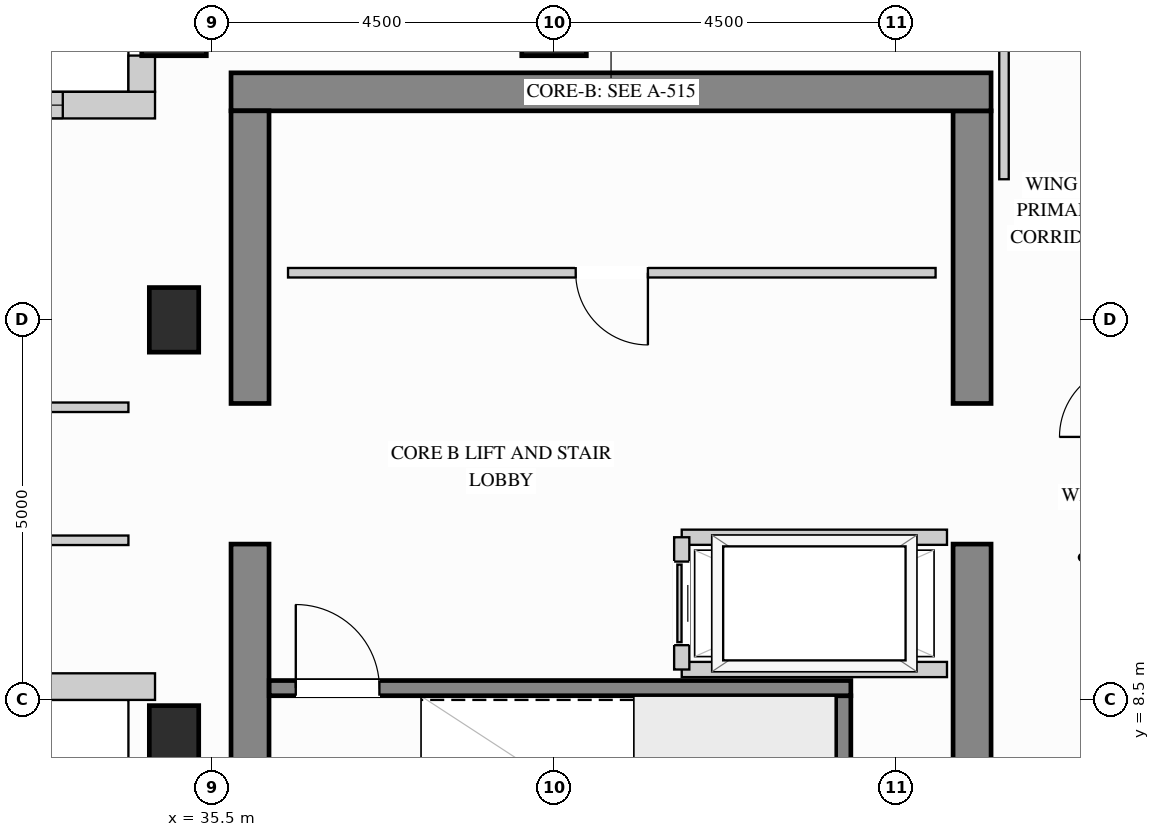
"""IFC4 building model, lengths in metres.
Left out: names, types, materials, properties, quantities, classifications, styles, units other than length and angle.
Written with IfcOpenShell. Run it as: python <this file> out.ifc"""

import sys

from ifc_helpers import new_model, si_unit, direction, frame, frame_2d, origin, origin_2d, place, context, subcontext, project, spatial, rectangle, extrude, source, transform, mapped, element, fill, save


model = new_model("IFC4")
c1 = context("Model", 3, precision=1e-05, world=origin(), true_north=direction((0.0, 1.0)))
c2 = subcontext(c1, "Body", "Model", "MODEL_VIEW")
j1 = project(units=[si_unit("LENGTHUNIT", "METRE"), si_unit("PLANEANGLEUNIT", "RADIAN")], contexts=[c1])
p1 = place(None, origin())
s1 = spatial("IfcSite", under=j1, at=p1, CompositionType="ELEMENT")
p2 = place(p1, origin())
s2 = spatial("IfcBuilding", under=s1, at=p2, CompositionType="ELEMENT")
p3 = place(p2, frame((0.0, 0.0, 223.2)))
s3 = spatial("IfcBuildingStorey", under=s2, at=p3, CompositionType="ELEMENT", Elevation=223.2)
m1 = source(origin(), c2, "Body", "SweptSolid", [
    extrude(rectangle(XDim=0.65, YDim=0.85, at=origin_2d()), origin(), (0.0, 0.0, 1.0), 3.4),
])
for number, where, z_axis, x_axis in (
    (1, (35.0, 13.5, 0.0), (0.0, 0.0, 1.0), (1.0, 0.0, 0.0)),
    (2, (35.0, 8.0, 0.0), (0.0, 0.0, 1.0), (1.0, 0.0, 0.0)),
):
    element("IfcColumn", number, at=place(p3, frame(where, z_axis=z_axis, x_axis=x_axis)), inside=s3, PredefinedType="COLUMN", context=c2, shape_type="MappedRepresentation", body=[
        mapped(m1, transform((0.0, 0.0, 0.0), x_axis=(1.0, 0.0, 0.0), y_axis=(0.0, 1.0, 0.0), z_axis=(0.0, 0.0, 1.0))),
    ])
m2 = source(origin(), c2, "Body", "SweptSolid", [
    extrude(rectangle(XDim=0.85, YDim=0.85, at=origin_2d()), origin(), (0.0, 0.0, 1.0), 3.4),
])
for number, where, z_axis, x_axis in (
    (3, (35.0, 17.4, 0.0), (0.0, 0.0, 1.0), (1.0, 0.0, 0.0)),
    (4, (40.0, 17.4, 0.0), (0.0, 0.0, 1.0), (1.0, 0.0, 0.0)),
):
    element("IfcColumn", number, at=place(p3, frame(where, z_axis=z_axis, x_axis=x_axis)), inside=s3, PredefinedType="COLUMN", context=c2, shape_type="MappedRepresentation", body=[
        mapped(m2, transform((0.0, 0.0, 0.0), x_axis=(1.0, 0.0, 0.0), y_axis=(0.0, 1.0, 0.0), z_axis=(0.0, 0.0, 1.0))),
    ])
m3 = source(origin(), c2, "Body", "SweptSolid", [
    extrude(rectangle(XDim=5.8, YDim=0.5, at=frame_2d((2.9, 0.0))), origin(), (0.0, 0.0, 1.0), 3.4),
])
p4 = place(p3, frame((45.5, 4.75, 0.0), z_axis=(0.0, 0.0, 1.0), x_axis=(0.0, 1.0, 0.0)))
e5 = element("IfcWall", 5, at=p4, inside=s3, PredefinedType="SHEAR", context=c2, shape_type="MappedRepresentation", body=[
    mapped(m3, transform((0.0, 0.0, 0.0), x_axis=(1.0, 0.0, 0.0), y_axis=(0.0, 1.0, 0.0), z_axis=(0.0, 0.0, 1.0))),
])
m4 = source(origin(), c2, "Body", "SweptSolid", [
    extrude(rectangle(XDim=3.85, YDim=0.5, at=frame_2d((1.925, 0.0))), origin(), (0.0, 0.0, 1.0), 3.4),
])
p5 = place(p3, frame((45.5, 12.4, 0.0), z_axis=(0.0, 0.0, 1.0), x_axis=(0.0, 1.0, 0.0)))
e6 = element("IfcWall", 6, at=p5, inside=s3, PredefinedType="SHEAR", context=c2, shape_type="MappedRepresentation", body=[
    mapped(m4, transform((0.0, 0.0, 0.0), x_axis=(1.0, 0.0, 0.0), y_axis=(0.0, 1.0, 0.0), z_axis=(0.0, 0.0, 1.0))),
])
m5 = source(origin(), c2, "Body", "SweptSolid", [
    extrude(rectangle(XDim=10.0, YDim=0.5, at=frame_2d((5.0, 0.0))), origin(), (0.0, 0.0, 1.0), 3.4),
])
p6 = place(p3, frame((35.75, 16.5, 0.0), z_axis=(0.0, 0.0, 1.0), x_axis=(1.0, 0.0, 0.0)))
e7 = element("IfcWall", 7, at=p6, inside=s3, PredefinedType="SHEAR", context=c2, shape_type="MappedRepresentation", body=[
    mapped(m5, transform((0.0, 0.0, 0.0), x_axis=(1.0, 0.0, 0.0), y_axis=(0.0, 1.0, 0.0), z_axis=(0.0, 0.0, 1.0))),
])
p7 = place(p3, frame((36.0, 4.75, 0.0), z_axis=(0.0, 0.0, 1.0), x_axis=(0.0, 1.0, 0.0)))
e8 = element("IfcWall", 8, at=p7, inside=s3, PredefinedType="SHEAR", context=c2, shape_type="MappedRepresentation", body=[
    mapped(m3, transform((0.0, 0.0, 0.0), x_axis=(1.0, 0.0, 0.0), y_axis=(0.0, 1.0, 0.0), z_axis=(0.0, 0.0, 1.0))),
])
p8 = place(p3, frame((36.0, 12.4, 0.0), z_axis=(0.0, 0.0, 1.0), x_axis=(0.0, 1.0, 0.0)))
e9 = element("IfcWall", 9, at=p8, inside=s3, PredefinedType="SHEAR", context=c2, shape_type="MappedRepresentation", body=[
    mapped(m4, transform((0.0, 0.0, 0.0), x_axis=(1.0, 0.0, 0.0), y_axis=(0.0, 1.0, 0.0), z_axis=(0.0, 0.0, 1.0))),
])
p9 = place(p3, frame((19.323, 8.675, 0.0), z_axis=(0.0, 0.0, 1.0), x_axis=(1.0, 0.0, 0.0)))
e10 = element("IfcWall", 10, at=p9, inside=s3, PredefinedType="SOLIDWALL", context=c2, shape_type="SweptSolid", body=[
    extrude(rectangle(XDim=15.427, YDim=0.35, at=frame_2d((7.713, 0.0))), origin(), (0.0, 0.0, 1.0), 3.385),
])
p10 = place(p9, frame((4.249, 0.0, 0.78)))
e11 = element("IfcOpeningElement", 11, at=p10, cuts=e10, PredefinedType="OPENING", context=c2, shape_type="SweptSolid", body=[
    extrude(rectangle(XDim=1.5, YDim=2.0, at=frame_2d((0.75, 1.0))), frame((0.0, 0.185, 0.0), z_axis=(0.0, -1.0, 0.0), x_axis=(1.0, 0.0, 0.0)), (0.0, 0.0, 1.0), 0.37),
])
p11 = place(p9, frame((9.678, 0.0, 0.78)))
e12 = element("IfcOpeningElement", 12, at=p11, cuts=e10, PredefinedType="OPENING", context=c2, shape_type="SweptSolid", body=[
    extrude(rectangle(XDim=1.5, YDim=2.0, at=frame_2d((0.75, 1.0))), frame((0.0, 0.185, 0.0), z_axis=(0.0, -1.0, 0.0), x_axis=(1.0, 0.0, 0.0)), (0.0, 0.0, 1.0), 0.37),
])
m6 = source(origin(), c2, "Body", "SweptSolid", [
    extrude(rectangle(XDim=0.479, YDim=0.35, at=frame_2d((0.24, 0.0))), origin(), (0.0, 0.0, 1.0), 3.385),
])
p12 = place(p3, frame((34.575, 16.977, 0.0), z_axis=(0.0, 0.0, 1.0), x_axis=(0.0, -1.0, 0.0)))
e13 = element("IfcWall", 13, at=p12, inside=s3, PredefinedType="SOLIDWALL", context=c2, shape_type="MappedRepresentation", body=[
    mapped(m6, transform((0.0, 0.0, 0.0), x_axis=(1.0, 0.0, 0.0), y_axis=(0.0, 1.0, 0.0), z_axis=(0.0, 0.0, 1.0))),
])
p13 = place(p3, frame((34.75, 16.325, 0.0), z_axis=(0.0, 0.0, 1.0), x_axis=(-1.0, 0.0, 0.0)))
e14 = element("IfcWall", 14, at=p13, inside=s3, PredefinedType="SOLIDWALL", context=c2, shape_type="SweptSolid", body=[
    extrude(rectangle(XDim=3.927, YDim=0.35, at=frame_2d((1.963, 0.0))), origin(), (0.0, 0.0, 1.0), 3.385),
])
p14 = place(p13, frame((1.213, 0.0, 0.78)))
e15 = element("IfcOpeningElement", 15, at=p14, cuts=e14, PredefinedType="OPENING", context=c2, shape_type="SweptSolid", body=[
    extrude(rectangle(XDim=1.5, YDim=2.0, at=frame_2d((0.75, 1.0))), frame((0.0, 0.185, 0.0), z_axis=(0.0, -1.0, 0.0), x_axis=(1.0, 0.0, 0.0)), (0.0, 0.0, 1.0), 0.37),
])
p15 = place(p3, frame((36.5, 14.12, 0.0), z_axis=(0.0, 0.0, 1.0), x_axis=(1.0, 0.0, 0.0)))
e16 = element("IfcWall", 16, at=p15, inside=s3, PredefinedType="PARTITIONING", context=c2, shape_type="SweptSolid", body=[
    extrude(rectangle(XDim=8.52, YDim=0.125, at=frame_2d((4.26, 0.0))), origin(), (0.0, 0.0, 1.0), 3.385),
])
p16 = place(p15, frame((3.785, 0.0, 0.0)))
e17 = element("IfcOpeningElement", 17, at=p16, cuts=e16, PredefinedType="OPENING", context=c2, shape_type="SweptSolid", body=[
    extrude(rectangle(XDim=0.95, YDim=2.15, at=frame_2d((0.475, 1.075))), frame((0.0, 0.073, 0.0), z_axis=(0.0, -1.0, 0.0), x_axis=(1.0, 0.0, 0.0)), (0.0, 0.0, 1.0), 0.145),
])
m7 = source(origin(), c2, "Body", "SweptSolid", [
    extrude(rectangle(XDim=2.298, YDim=0.125, at=frame_2d((1.149, 0.0))), origin(), (0.0, 0.0, 1.0), 3.385),
])
p17 = place(p3, frame((45.92, 15.35, 0.0), z_axis=(0.0, 0.0, 1.0), x_axis=(0.0, 1.0, 0.0)))
e18 = element("IfcWall", 18, at=p17, inside=s3, PredefinedType="PARTITIONING", context=c2, shape_type="MappedRepresentation", body=[
    mapped(m7, transform((0.0, 0.0, 0.0), x_axis=(1.0, 0.0, 0.0), y_axis=(0.0, 1.0, 0.0), z_axis=(0.0, 0.0, 1.0))),
])
p18 = place(p3, frame((29.85, 12.35, 0.0), z_axis=(0.0, 0.0, 1.0), x_axis=(1.0, 0.0, 0.0)))
e19 = element("IfcWall", 19, at=p18, inside=s3, PredefinedType="PARTITIONING", context=c2, shape_type="SweptSolid", body=[
    extrude(rectangle(XDim=4.55, YDim=0.125, at=frame_2d((2.275, 0.0))), origin(), (0.0, 0.0, 1.0), 3.385),
])
p19 = place(p18, frame((1.8, 0.0, 0.0)))
e20 = element("IfcOpeningElement", 20, at=p19, cuts=e19, PredefinedType="OPENING", context=c2, shape_type="SweptSolid", body=[
    extrude(rectangle(XDim=0.95, YDim=2.15, at=frame_2d((0.475, 1.075))), frame((0.0, 0.073, 0.0), z_axis=(0.0, -1.0, 0.0), x_axis=(1.0, 0.0, 0.0)), (0.0, 0.0, 1.0), 0.145),
])
p20 = place(p3, frame((19.5, 10.6, 0.0), z_axis=(0.0, 0.0, 1.0), x_axis=(1.0, 0.0, 0.0)))
e21 = element("IfcWall", 21, at=p20, inside=s3, PredefinedType="PARTITIONING", context=c2, shape_type="SweptSolid", body=[
    extrude(rectangle(XDim=14.9, YDim=0.125, at=frame_2d((7.45, 0.0))), origin(), (0.0, 0.0, 1.0), 3.385),
])
p21 = place(p20, frame((6.975, 0.0, 0.0)))
e22 = element("IfcOpeningElement", 22, at=p21, cuts=e21, PredefinedType="OPENING", context=c2, shape_type="SweptSolid", body=[
    extrude(rectangle(XDim=0.95, YDim=2.15, at=frame_2d((0.475, 1.075))), frame((0.0, 0.073, 0.0), z_axis=(0.0, -1.0, 0.0), x_axis=(1.0, 0.0, 0.0)), (0.0, 0.0, 1.0), 0.145),
])
m8 = source(origin(), c2, "Body", "SweptSolid", [
    extrude(rectangle(XDim=3.49, YDim=0.2, at=frame_2d((1.745, 0.0))), origin(), (0.0, 0.0, 1.0), 3.385),
])
for number, where, z_axis, x_axis in (
    (23, (41.68, 10.64, 0.0), (0.0, 0.0, 1.0), (1.0, 0.0, 0.0)),
    (24, (41.68, 8.9, 0.0), (0.0, 0.0, 1.0), (1.0, 0.0, 0.0)),
):
    element("IfcWall", number, at=place(p3, frame(where, z_axis=z_axis, x_axis=x_axis)), inside=s3, PredefinedType="PARTITIONING", context=c2, shape_type="MappedRepresentation", body=[
        mapped(m8, transform((0.0, 0.0, 0.0), x_axis=(1.0, 0.0, 0.0), y_axis=(0.0, 1.0, 0.0), z_axis=(0.0, 0.0, 1.0))),
    ])
p22 = place(p3, frame((41.68, 8.9, 0.0), z_axis=(0.0, 0.0, 1.0), x_axis=(0.0, 1.0, 0.0)))
e25 = element("IfcWall", 25, at=p22, inside=s3, PredefinedType="PARTITIONING", context=c2, shape_type="SweptSolid", body=[
    extrude(rectangle(XDim=1.74, YDim=0.2, at=frame_2d((0.87, 0.0))), origin(), (0.0, 0.0, 1.0), 3.385),
])
p23 = place(p22, frame((0.32, 0.0, 0.0)))
e26 = element("IfcOpeningElement", 26, at=p23, cuts=e25, PredefinedType="OPENING", context=c2, shape_type="SweptSolid", body=[
    extrude(rectangle(XDim=1.1, YDim=2.2, at=frame_2d((0.55, 1.1))), frame((0.0, 0.11, 0.0), z_axis=(0.0, -1.0, 0.0), x_axis=(1.0, 0.0, 0.0)), (0.0, 0.0, 1.0), 0.22),
])
m9 = source(origin(), c2, "Body", "SweptSolid", [
    extrude(rectangle(XDim=3.803, YDim=0.2, at=frame_2d((1.901, 0.0))), origin(), (0.0, 0.0, 1.0), 3.4),
])
p24 = place(p3, frame((43.805, 4.752, 0.0), z_axis=(0.0, 0.0, 1.0), x_axis=(0.0, 1.0, 0.0)))
e27 = element("IfcWall", 27, at=p24, inside=s3, PredefinedType="SHEAR", context=c2, shape_type="MappedRepresentation", body=[
    mapped(m9, transform((0.0, 0.0, 0.0), x_axis=(1.0, 0.0, 0.0), y_axis=(0.0, 1.0, 0.0), z_axis=(0.0, 0.0, 1.0))),
])
p25 = place(p3, frame((36.252, 8.655, 0.0), z_axis=(0.0, 0.0, 1.0), x_axis=(1.0, 0.0, 0.0)))
e28 = element("IfcWall", 28, at=p25, inside=s3, PredefinedType="SHEAR", context=c2, shape_type="SweptSolid", body=[
    extrude(rectangle(XDim=7.653, YDim=0.2, at=frame_2d((3.827, 0.0))), origin(), (0.0, 0.0, 1.0), 3.4),
])
p26 = place(p25, frame((0.35, 0.0, 0.0)))
e29 = element("IfcOpeningElement", 29, at=p26, cuts=e28, PredefinedType="OPENING", context=c2, shape_type="SweptSolid", body=[
    extrude(rectangle(XDim=1.1, YDim=2.15, at=frame_2d((0.55, 1.075))), frame((0.0, 0.11, 0.0), z_axis=(0.0, -1.0, 0.0), x_axis=(1.0, 0.0, 0.0)), (0.0, 0.0, 1.0), 0.22),
])
m10 = source(origin(), c2, "Body", "SweptSolid", [
    extrude(rectangle(XDim=1.1, YDim=2.2, at=frame_2d((0.55, 1.1))), frame((0.0, 0.025, 0.0), z_axis=(0.0, -1.0, 0.0), x_axis=(1.0, 0.0, 0.0)), (0.0, 0.0, 1.0), 0.05),
])
p27 = place(p23, origin())
e30 = element("IfcDoor", 30, at=p27, inside=s3, OperationType="SLIDING_TO_LEFT", PredefinedType="DOOR", context=c2, shape_type="MappedRepresentation", body=[
    mapped(m10, transform((0.0, 0.0, 0.0), x_axis=(1.0, 0.0, 0.0), y_axis=(0.0, 1.0, 0.0), z_axis=(0.0, 0.0, 1.0))),
])
fill(e26, e30)
m11 = source(origin(), c2, "Body", "SweptSolid", [
    extrude(rectangle(XDim=0.95, YDim=2.15, at=frame_2d((0.475, 1.075))), frame((0.0, 0.025, 0.0), z_axis=(0.0, -1.0, 0.0), x_axis=(1.0, 0.0, 0.0)), (0.0, 0.0, 1.0), 0.05),
])
p28 = place(p16, origin())
e31 = element("IfcDoor", 31, at=p28, inside=s3, OperationType="SINGLE_SWING_RIGHT", PredefinedType="DOOR", context=c2, shape_type="MappedRepresentation", body=[
    mapped(m11, transform((0.0, 0.0, 0.0), x_axis=(1.0, 0.0, 0.0), y_axis=(0.0, 1.0, 0.0), z_axis=(0.0, 0.0, 1.0))),
])
fill(e17, e31)
m12 = source(origin(), c2, "Body", "SweptSolid", [
    extrude(rectangle(XDim=1.1, YDim=2.15, at=frame_2d((0.55, 1.075))), frame((0.0, 0.025, 0.0), z_axis=(0.0, -1.0, 0.0), x_axis=(1.0, 0.0, 0.0)), (0.0, 0.0, 1.0), 0.05),
])
p29 = place(p26, origin())
e32 = element("IfcDoor", 32, at=p29, inside=s3, OperationType="SINGLE_SWING_LEFT", PredefinedType="DOOR", context=c2, shape_type="MappedRepresentation", body=[
    mapped(m12, transform((0.0, 0.0, 0.0), x_axis=(1.0, 0.0, 0.0), y_axis=(0.0, 1.0, 0.0), z_axis=(0.0, 0.0, 1.0))),
])
fill(e29, e32)
m13 = source(origin(), c2, "Body", "SweptSolid", [
    extrude(rectangle(XDim=1.5, YDim=2.0, at=frame_2d((0.75, 1.0))), frame((0.0, 0.03, 0.0), z_axis=(0.0, -1.0, 0.0), x_axis=(1.0, 0.0, 0.0)), (0.0, 0.0, 1.0), 0.06),
])
p30 = place(p14, origin())
e33 = element("IfcWindow", 33, at=p30, inside=s3, PartitioningType="SINGLE_PANEL", PredefinedType="WINDOW", context=c2, shape_type="MappedRepresentation", body=[
    mapped(m13, transform((0.0, 0.0, 0.0), x_axis=(1.0, 0.0, 0.0), y_axis=(0.0, 1.0, 0.0), z_axis=(0.0, 0.0, 1.0))),
])
fill(e15, e33)
save(model, sys.argv[1])
